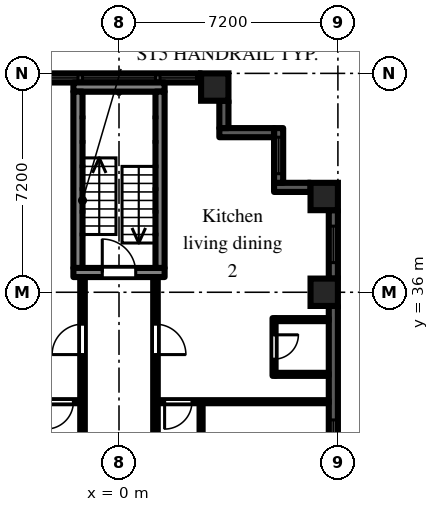
"""IFC4 building model, lengths in metres.
Left out: names, types, materials, properties, quantities, classifications, styles, units other than length and angle.
Written with IfcOpenShell. Run it as: python <this file> out.ifc"""

import sys

from ifc_helpers import new_model, si_unit, direction, frame, frame_2d, origin, origin_2d, place, context, subcontext, project, spatial, rectangle, extrude, element, fill, save


model = new_model("IFC4")
c1 = context("Model", 3, precision=1e-05, world=origin(), true_north=direction((0.0, 1.0)))
c2 = subcontext(c1, "Body", "Model", "MODEL_VIEW")
j1 = project(units=[si_unit("LENGTHUNIT", "METRE"), si_unit("PLANEANGLEUNIT", "RADIAN")], contexts=[c1])
p1 = place(None, origin())
s1 = spatial("IfcSite", under=j1, at=p1, CompositionType="ELEMENT")
p2 = place(p1, origin())
s2 = spatial("IfcBuilding", under=s1, at=p2, CompositionType="ELEMENT")
p3 = place(p2, frame((0.0, 0.0, 29.7)))
s3 = spatial("IfcBuildingStorey", under=s2, at=p3, CompositionType="ELEMENT", Elevation=29.7)
for number, where, z_axis, x_axis in (
    (1, (3.15, 42.75, 0.0), (0.0, 0.0, 1.0), (1.0, 0.0, 0.0)),
    (2, (6.75, 36.0, 0.0), (0.0, 0.0, 1.0), (1.0, 0.0, 0.0)),
    (3, (6.75, 39.15, 0.0), (0.0, 0.0, 1.0), (1.0, 0.0, 0.0)),
):
    element("IfcColumn", number, at=place(p3, frame(where, z_axis=z_axis, x_axis=x_axis)), inside=s3, PredefinedType="COLUMN", context=c2, shape_type="SweptSolid", body=[
        extrude(rectangle(XDim=0.9, YDim=0.9, at=origin_2d()), origin(), (0.0, 0.0, 1.0), 3.0),
    ])
p4 = place(p3, frame((7.05, 29.25, 0.0), z_axis=(0.0, 0.0, 1.0), x_axis=(0.0, 1.0, 0.0)))
e4 = element("IfcWall", 4, at=p4, inside=s3, PredefinedType="SOLIDWALL", context=c2, shape_type="SweptSolid", body=[
    extrude(rectangle(XDim=6.3, YDim=0.3, at=frame_2d((3.15, 0.0))), origin(), (0.0, 0.0, 1.0), 2.1),
])
p5 = place(p4, frame((0.15, 0.0, 0.2)))
e5 = element("IfcOpeningElement", 5, at=p5, cuts=e4, PredefinedType="OPENING", context=c2, shape_type="SweptSolid", body=[
    extrude(rectangle(XDim=2.4, YDim=1.85, at=frame_2d((1.2, 0.925))), frame((0.0, 0.16, 0.0), z_axis=(0.0, -1.0, 0.0), x_axis=(1.0, 0.0, 0.0)), (0.0, 0.0, 1.0), 0.32),
])
p6 = place(p3, frame((7.05, 36.45, 0.0), z_axis=(0.0, 0.0, 1.0), x_axis=(0.0, 1.0, 0.0)))
e6 = element("IfcWall", 6, at=p6, inside=s3, PredefinedType="SOLIDWALL", context=c2, shape_type="SweptSolid", body=[
    extrude(rectangle(XDim=2.25, YDim=0.3, at=frame_2d((1.125, 0.0))), origin(), (0.0, 0.0, 1.0), 2.1),
])
p7 = place(p6, frame((0.525, 0.0, 0.2)))
e7 = element("IfcOpeningElement", 7, at=p7, cuts=e6, PredefinedType="OPENING", context=c2, shape_type="SweptSolid", body=[
    extrude(rectangle(XDim=1.2, YDim=1.85, at=frame_2d((0.6, 0.925))), frame((0.0, 0.16, 0.0), z_axis=(0.0, -1.0, 0.0), x_axis=(1.0, 0.0, 0.0)), (0.0, 0.0, 1.0), 0.32),
])
p8 = place(p3, frame((6.3, 39.45, 0.0), z_axis=(0.0, 0.0, 1.0), x_axis=(-1.0, 0.0, 0.0)))
e8 = element("IfcWall", 8, at=p8, inside=s3, PredefinedType="SOLIDWALL", context=c2, shape_type="SweptSolid", body=[
    extrude(rectangle(XDim=1.2, YDim=0.3, at=frame_2d((0.6, 0.0))), origin(), (0.0, 0.0, 1.0), 2.575),
])
p9 = place(p3, frame((5.25, 39.6, 0.0), z_axis=(0.0, 0.0, 1.0), x_axis=(0.0, 1.0, 0.0)))
e9 = element("IfcWall", 9, at=p9, inside=s3, PredefinedType="SOLIDWALL", context=c2, shape_type="SweptSolid", body=[
    extrude(rectangle(XDim=1.8, YDim=0.3, at=frame_2d((0.9, 0.0))), origin(), (0.0, 0.0, 1.0), 2.575),
])
p10 = place(p9, frame((0.3, 0.0, 0.2)))
e10 = element("IfcOpeningElement", 10, at=p10, cuts=e9, PredefinedType="OPENING", context=c2, shape_type="SweptSolid", body=[
    extrude(rectangle(XDim=1.2, YDim=1.85, at=frame_2d((0.6, 0.925))), frame((0.0, 0.16, 0.0), z_axis=(0.0, -1.0, 0.0), x_axis=(1.0, 0.0, 0.0)), (0.0, 0.0, 1.0), 0.32),
])
p11 = place(p3, frame((5.1, 41.25, 0.0), z_axis=(0.0, 0.0, 1.0), x_axis=(-1.0, 0.0, 0.0)))
e11 = element("IfcWall", 11, at=p11, inside=s3, PredefinedType="SOLIDWALL", context=c2, shape_type="SweptSolid", body=[
    extrude(rectangle(XDim=1.8, YDim=0.3, at=frame_2d((0.9, 0.0))), origin(), (0.0, 0.0, 1.0), 2.575),
])
p12 = place(p3, frame((3.45, 41.4, 0.0), z_axis=(0.0, 0.0, 1.0), x_axis=(0.0, 1.0, 0.0)))
e12 = element("IfcWall", 12, at=p12, inside=s3, PredefinedType="SOLIDWALL", context=c2, shape_type="SweptSolid", body=[
    extrude(rectangle(XDim=0.9, YDim=0.3, at=frame_2d((0.45, 0.0))), origin(), (0.0, 0.0, 1.0), 2.575),
])
p13 = place(p3, frame((2.7, 43.05, 0.0), z_axis=(0.0, 0.0, 1.0), x_axis=(-1.0, 0.0, 0.0)))
e13 = element("IfcWall", 13, at=p13, inside=s3, PredefinedType="SOLIDWALL", context=c2, shape_type="SweptSolid", body=[
    extrude(rectangle(XDim=5.4, YDim=0.3, at=frame_2d((2.7, 0.0))), origin(), (0.0, 0.0, 1.0), 2.1),
])
p14 = place(p13, frame((1.5, 0.0, 0.2)))
e14 = element("IfcOpeningElement", 14, at=p14, cuts=e13, PredefinedType="OPENING", context=c2, shape_type="SweptSolid", body=[
    extrude(rectangle(XDim=2.4, YDim=1.85, at=frame_2d((1.2, 0.925))), frame((0.0, 0.16, 0.0), z_axis=(0.0, -1.0, 0.0), x_axis=(1.0, 0.0, 0.0)), (0.0, 0.0, 1.0), 0.32),
])
p15 = place(p13, frame((0.15, 0.0, 0.2)))
e15 = element("IfcOpeningElement", 15, at=p15, cuts=e13, PredefinedType="OPENING", context=c2, shape_type="SweptSolid", body=[
    extrude(rectangle(XDim=1.2, YDim=1.85, at=frame_2d((0.6, 0.925))), frame((0.0, 0.16, 0.0), z_axis=(0.0, -1.0, 0.0), x_axis=(1.0, 0.0, 0.0)), (0.0, 0.0, 1.0), 0.32),
])
p16 = place(p13, frame((4.05, 0.0, 0.2)))
e16 = element("IfcOpeningElement", 16, at=p16, cuts=e13, PredefinedType="OPENING", context=c2, shape_type="SweptSolid", body=[
    extrude(rectangle(XDim=1.2, YDim=1.85, at=frame_2d((0.6, 0.925))), frame((0.0, 0.16, 0.0), z_axis=(0.0, -1.0, 0.0), x_axis=(1.0, 0.0, 0.0)), (0.0, 0.0, 1.0), 0.32),
])
p17 = place(p3, frame((-1.5, 36.65, 0.0), z_axis=(0.0, 0.0, 1.0), x_axis=(1.0, 0.0, 0.0)))
e17 = element("IfcWall", 17, at=p17, inside=s3, PredefinedType="SHEAR", context=c2, shape_type="SweptSolid", body=[
    extrude(rectangle(XDim=3.0, YDim=0.3, at=frame_2d((1.5, 0.0))), origin(), (0.0, 0.0, 1.0), 2.575),
])
p18 = place(p17, frame((0.95, 0.0, 0.0)))
e18 = element("IfcOpeningElement", 18, at=p18, cuts=e17, PredefinedType="OPENING", context=c2, shape_type="SweptSolid", body=[
    extrude(rectangle(XDim=1.1, YDim=2.1, at=frame_2d((0.55, 1.05))), frame((0.0, 0.16, 0.0), z_axis=(0.0, -1.0, 0.0), x_axis=(1.0, 0.0, 0.0)), (0.0, 0.0, 1.0), 0.32),
])
p19 = place(p3, frame((-1.5, 42.75, 0.0), z_axis=(0.0, 0.0, 1.0), x_axis=(1.0, 0.0, 0.0)))
e19 = element("IfcWall", 19, at=p19, inside=s3, PredefinedType="SHEAR", context=c2, shape_type="SweptSolid", body=[
    extrude(rectangle(XDim=3.0, YDim=0.3, at=frame_2d((1.5, 0.0))), origin(), (0.0, 0.0, 1.0), 2.575),
])
for number, where, z_axis, x_axis in (
    (20, (-1.35, 36.8, 0.0), (0.0, 0.0, 1.0), (0.0, 1.0, 0.0)),
    (21, (1.35, 36.8, 0.0), (0.0, 0.0, 1.0), (0.0, 1.0, 0.0)),
):
    element("IfcWall", number, at=place(p3, frame(where, z_axis=z_axis, x_axis=x_axis)), inside=s3, PredefinedType="SHEAR", context=c2, shape_type="SweptSolid", body=[
        extrude(rectangle(XDim=5.8, YDim=0.3, at=frame_2d((2.9, 0.0))), origin(), (0.0, 0.0, 1.0), 2.575),
    ])
p20 = place(p3, frame((-6.9, 32.4, 0.0), z_axis=(0.0, 0.0, 1.0), x_axis=(1.0, 0.0, 0.0)))
e22 = element("IfcWall", 22, at=p20, inside=s3, PredefinedType="PARTITIONING", context=c2, shape_type="SweptSolid", body=[
    extrude(rectangle(XDim=5.625, YDim=0.1, at=frame_2d((2.812, 0.0))), origin(), (0.0, 0.0, 1.0), 2.575),
])
p21 = place(p20, frame((4.5, 0.0, 0.0)))
e23 = element("IfcOpeningElement", 23, at=p21, cuts=e22, PredefinedType="OPENING", context=c2, shape_type="SweptSolid", body=[
    extrude(rectangle(XDim=0.9, YDim=2.1, at=frame_2d((0.45, 1.05))), frame((0.0, 0.06, 0.0), z_axis=(0.0, -1.0, 0.0), x_axis=(1.0, 0.0, 0.0)), (0.0, 0.0, 1.0), 0.12),
])
p22 = place(p3, frame((-1.2, 1.125, 0.0), z_axis=(0.0, 0.0, 1.0), x_axis=(0.0, 1.0, 0.0)))
e24 = element("IfcWall", 24, at=p22, inside=s3, PredefinedType="PARTITIONING", context=c2, shape_type="SweptSolid", body=[
    extrude(rectangle(XDim=35.375, YDim=0.15, at=frame_2d((17.688, 0.0))), origin(), (0.0, 0.0, 1.0), 2.575),
])
p23 = place(p22, frame((2.625, 0.0, 0.0)))
e25 = element("IfcOpeningElement", 25, at=p23, cuts=e24, PredefinedType="OPENING", context=c2, shape_type="SweptSolid", body=[
    extrude(rectangle(XDim=0.9, YDim=2.1, at=frame_2d((0.45, 1.05))), frame((0.0, 0.085, 0.0), z_axis=(0.0, -1.0, 0.0), x_axis=(1.0, 0.0, 0.0)), (0.0, 0.0, 1.0), 0.17),
])
p24 = place(p22, frame((11.025, 0.0, 0.0)))
e26 = element("IfcOpeningElement", 26, at=p24, cuts=e24, PredefinedType="OPENING", context=c2, shape_type="SweptSolid", body=[
    extrude(rectangle(XDim=0.9, YDim=2.1, at=frame_2d((0.45, 1.05))), frame((0.0, 0.085, 0.0), z_axis=(0.0, -1.0, 0.0), x_axis=(1.0, 0.0, 0.0)), (0.0, 0.0, 1.0), 0.17),
])
p25 = place(p22, frame((14.625, 0.0, 0.0)))
e27 = element("IfcOpeningElement", 27, at=p25, cuts=e24, PredefinedType="OPENING", context=c2, shape_type="SweptSolid", body=[
    extrude(rectangle(XDim=0.9, YDim=2.1, at=frame_2d((0.45, 1.05))), frame((0.0, 0.085, 0.0), z_axis=(0.0, -1.0, 0.0), x_axis=(1.0, 0.0, 0.0)), (0.0, 0.0, 1.0), 0.17),
])
p26 = place(p22, frame((32.825, 0.0, 0.0)))
e28 = element("IfcOpeningElement", 28, at=p26, cuts=e24, PredefinedType="OPENING", context=c2, shape_type="SweptSolid", body=[
    extrude(rectangle(XDim=1.0, YDim=2.1, at=frame_2d((0.5, 1.05))), frame((0.0, 0.085, 0.0), z_axis=(0.0, -1.0, 0.0), x_axis=(1.0, 0.0, 0.0)), (0.0, 0.0, 1.0), 0.17),
])
p27 = place(p3, frame((1.2, 1.125, 0.0), z_axis=(0.0, 0.0, 1.0), x_axis=(0.0, 1.0, 0.0)))
e29 = element("IfcWall", 29, at=p27, inside=s3, PredefinedType="PARTITIONING", context=c2, shape_type="SweptSolid", body=[
    extrude(rectangle(XDim=35.375, YDim=0.15, at=frame_2d((17.688, 0.0))), origin(), (0.0, 0.0, 1.0), 2.575),
])
p28 = place(p27, frame((3.725, 0.0, 0.0)))
e30 = element("IfcOpeningElement", 30, at=p28, cuts=e29, PredefinedType="OPENING", context=c2, shape_type="SweptSolid", body=[
    extrude(rectangle(XDim=0.9, YDim=2.1, at=frame_2d((0.45, 1.05))), frame((0.0, 0.085, 0.0), z_axis=(0.0, -1.0, 0.0), x_axis=(1.0, 0.0, 0.0)), (0.0, 0.0, 1.0), 0.17),
])
p29 = place(p27, frame((7.425, 0.0, 0.0)))
e31 = element("IfcOpeningElement", 31, at=p29, cuts=e29, PredefinedType="OPENING", context=c2, shape_type="SweptSolid", body=[
    extrude(rectangle(XDim=0.9, YDim=2.1, at=frame_2d((0.45, 1.05))), frame((0.0, 0.085, 0.0), z_axis=(0.0, -1.0, 0.0), x_axis=(1.0, 0.0, 0.0)), (0.0, 0.0, 1.0), 0.17),
])
p30 = place(p27, frame((13.475, 0.0, 0.0)))
e32 = element("IfcOpeningElement", 32, at=p30, cuts=e29, PredefinedType="OPENING", context=c2, shape_type="SweptSolid", body=[
    extrude(rectangle(XDim=1.0, YDim=2.1, at=frame_2d((0.5, 1.05))), frame((0.0, 0.085, 0.0), z_axis=(0.0, -1.0, 0.0), x_axis=(1.0, 0.0, 0.0)), (0.0, 0.0, 1.0), 0.17),
])
p31 = place(p27, frame((32.825, 0.0, 0.0)))
e33 = element("IfcOpeningElement", 33, at=p31, cuts=e29, PredefinedType="OPENING", context=c2, shape_type="SweptSolid", body=[
    extrude(rectangle(XDim=1.0, YDim=2.1, at=frame_2d((0.5, 1.05))), frame((0.0, 0.085, 0.0), z_axis=(0.0, -1.0, 0.0), x_axis=(1.0, 0.0, 0.0)), (0.0, 0.0, 1.0), 0.17),
])
p32 = place(p3, frame((1.275, 32.4, 0.0), z_axis=(0.0, 0.0, 1.0), x_axis=(1.0, 0.0, 0.0)))
e34 = element("IfcWall", 34, at=p32, inside=s3, PredefinedType="PARTITIONING", context=c2, shape_type="SweptSolid", body=[
    extrude(rectangle(XDim=5.625, YDim=0.1, at=frame_2d((2.812, 0.0))), origin(), (0.0, 0.0, 1.0), 2.575),
])
p33 = place(p32, frame((0.225, 0.0, 0.0)))
e35 = element("IfcOpeningElement", 35, at=p33, cuts=e34, PredefinedType="OPENING", context=c2, shape_type="SweptSolid", body=[
    extrude(rectangle(XDim=0.9, YDim=2.1, at=frame_2d((0.45, 1.05))), frame((0.0, 0.06, 0.0), z_axis=(0.0, -1.0, 0.0), x_axis=(1.0, 0.0, 0.0)), (0.0, 0.0, 1.0), 0.12),
])
p34 = place(p3, frame((2.7, 18.1, 0.0), z_axis=(0.0, 0.0, 1.0), x_axis=(0.0, 1.0, 0.0)))
e36 = element("IfcWall", 36, at=p34, inside=s3, PredefinedType="PARTITIONING", context=c2, shape_type="SweptSolid", body=[
    extrude(rectangle(XDim=14.25, YDim=0.1, at=frame_2d((7.125, 0.0))), origin(), (0.0, 0.0, 1.0), 2.575),
])
p35 = place(p34, frame((3.23, 0.0, 0.0)))
e37 = element("IfcOpeningElement", 37, at=p35, cuts=e36, PredefinedType="OPENING", context=c2, shape_type="SweptSolid", body=[
    extrude(rectangle(XDim=0.9, YDim=2.1, at=frame_2d((0.45, 1.05))), frame((0.0, 0.06, 0.0), z_axis=(0.0, -1.0, 0.0), x_axis=(1.0, 0.0, 0.0)), (0.0, 0.0, 1.0), 0.12),
])
p36 = place(p34, frame((10.07, 0.0, 0.0)))
e38 = element("IfcOpeningElement", 38, at=p36, cuts=e36, PredefinedType="OPENING", context=c2, shape_type="SweptSolid", body=[
    extrude(rectangle(XDim=0.9, YDim=2.1, at=frame_2d((0.45, 1.05))), frame((0.0, 0.06, 0.0), z_axis=(0.0, -1.0, 0.0), x_axis=(1.0, 0.0, 0.0)), (0.0, 0.0, 1.0), 0.12),
])
p37 = place(p3, frame((5.1, 33.25, 0.0), z_axis=(0.0, 0.0, 1.0), x_axis=(0.0, 1.0, 0.0)))
e39 = element("IfcWall", 39, at=p37, inside=s3, PredefinedType="PARTITIONING", context=c2, shape_type="SweptSolid", body=[
    extrude(rectangle(XDim=1.9, YDim=0.1, at=frame_2d((0.95, 0.0))), origin(), (0.0, 0.0, 1.0), 2.575),
])
p38 = place(p37, frame((0.55, 0.0, 0.0)))
e40 = element("IfcOpeningElement", 40, at=p38, cuts=e39, PredefinedType="OPENING", context=c2, shape_type="SweptSolid", body=[
    extrude(rectangle(XDim=0.8, YDim=2.1, at=frame_2d((0.4, 1.05))), frame((0.0, 0.06, 0.0), z_axis=(0.0, -1.0, 0.0), x_axis=(1.0, 0.0, 0.0)), (0.0, 0.0, 1.0), 0.12),
])
for number, where, z_axis, x_axis in (
    (41, (5.15, 33.3, 0.0), (0.0, 0.0, 1.0), (1.0, 0.0, 0.0)),
    (42, (5.15, 35.1, 0.0), (0.0, 0.0, 1.0), (1.0, 0.0, 0.0)),
):
    element("IfcWall", number, at=place(p3, frame(where, z_axis=z_axis, x_axis=x_axis)), inside=s3, PredefinedType="PARTITIONING", context=c2, shape_type="SweptSolid", body=[
        extrude(rectangle(XDim=1.75, YDim=0.1, at=frame_2d((0.875, 0.0))), origin(), (0.0, 0.0, 1.0), 2.575),
    ])
p39 = place(p5, origin())
e43 = element("IfcWindow", 43, at=p39, inside=s3, PartitioningType="SINGLE_PANEL", PredefinedType="WINDOW", context=c2, shape_type="SweptSolid", body=[
    extrude(rectangle(XDim=2.4, YDim=1.85, at=frame_2d((1.2, 0.925))), frame((0.0, 0.03, 0.0), z_axis=(0.0, -1.0, 0.0), x_axis=(1.0, 0.0, 0.0)), (0.0, 0.0, 1.0), 0.06),
])
fill(e5, e43)
p40 = place(p7, origin())
e44 = element("IfcWindow", 44, at=p40, inside=s3, PartitioningType="SINGLE_PANEL", PredefinedType="WINDOW", context=c2, shape_type="SweptSolid", body=[
    extrude(rectangle(XDim=1.2, YDim=1.85, at=frame_2d((0.6, 0.925))), frame((0.0, 0.03, 0.0), z_axis=(0.0, -1.0, 0.0), x_axis=(1.0, 0.0, 0.0)), (0.0, 0.0, 1.0), 0.06),
])
fill(e7, e44)
p41 = place(p10, origin())
e45 = element("IfcWindow", 45, at=p41, inside=s3, PartitioningType="SINGLE_PANEL", PredefinedType="WINDOW", context=c2, shape_type="SweptSolid", body=[
    extrude(rectangle(XDim=1.2, YDim=1.85, at=frame_2d((0.6, 0.925))), frame((0.0, 0.03, 0.0), z_axis=(0.0, -1.0, 0.0), x_axis=(1.0, 0.0, 0.0)), (0.0, 0.0, 1.0), 0.06),
])
fill(e10, e45)
p42 = place(p14, origin())
e46 = element("IfcWindow", 46, at=p42, inside=s3, PartitioningType="SINGLE_PANEL", PredefinedType="WINDOW", context=c2, shape_type="SweptSolid", body=[
    extrude(rectangle(XDim=2.4, YDim=1.85, at=frame_2d((1.2, 0.925))), frame((0.0, 0.03, 0.0), z_axis=(0.0, -1.0, 0.0), x_axis=(1.0, 0.0, 0.0)), (0.0, 0.0, 1.0), 0.06),
])
fill(e14, e46)
p43 = place(p15, origin())
e47 = element("IfcWindow", 47, at=p43, inside=s3, PartitioningType="SINGLE_PANEL", PredefinedType="WINDOW", context=c2, shape_type="SweptSolid", body=[
    extrude(rectangle(XDim=1.2, YDim=1.85, at=frame_2d((0.6, 0.925))), frame((0.0, 0.03, 0.0), z_axis=(0.0, -1.0, 0.0), x_axis=(1.0, 0.0, 0.0)), (0.0, 0.0, 1.0), 0.06),
])
fill(e15, e47)
p44 = place(p16, origin())
e48 = element("IfcWindow", 48, at=p44, inside=s3, PartitioningType="SINGLE_PANEL", PredefinedType="WINDOW", context=c2, shape_type="SweptSolid", body=[
    extrude(rectangle(XDim=1.2, YDim=1.85, at=frame_2d((0.6, 0.925))), frame((0.0, 0.03, 0.0), z_axis=(0.0, -1.0, 0.0), x_axis=(1.0, 0.0, 0.0)), (0.0, 0.0, 1.0), 0.06),
])
fill(e16, e48)
p45 = place(p18, origin())
e49 = element("IfcDoor", 49, at=p45, inside=s3, OperationType="SINGLE_SWING_LEFT", PredefinedType="DOOR", context=c2, shape_type="SweptSolid", body=[
    extrude(rectangle(XDim=1.1, YDim=2.1, at=frame_2d((0.55, 1.05))), frame((0.0, 0.025, 0.0), z_axis=(0.0, -1.0, 0.0), x_axis=(1.0, 0.0, 0.0)), (0.0, 0.0, 1.0), 0.05),
])
fill(e18, e49)
p46 = place(p26, origin())
e50 = element("IfcDoor", 50, at=p46, inside=s3, OperationType="SINGLE_SWING_LEFT", PredefinedType="DOOR", context=c2, shape_type="SweptSolid", body=[
    extrude(rectangle(XDim=1.0, YDim=2.1, at=frame_2d((0.5, 1.05))), frame((0.0, 0.025, 0.0), z_axis=(0.0, -1.0, 0.0), x_axis=(1.0, 0.0, 0.0)), (0.0, 0.0, 1.0), 0.05),
])
fill(e28, e50)
p47 = place(p21, frame((0.9, 0.0, 0.0), z_axis=(0.0, 0.0, 1.0), x_axis=(-1.0, 0.0, 0.0)))
e51 = element("IfcDoor", 51, at=p47, inside=s3, OperationType="SINGLE_SWING_RIGHT", PredefinedType="DOOR", context=c2, shape_type="SweptSolid", body=[
    extrude(rectangle(XDim=0.9, YDim=2.1, at=frame_2d((0.45, 1.05))), frame((0.0, 0.025, 0.0), z_axis=(0.0, -1.0, 0.0), x_axis=(1.0, 0.0, 0.0)), (0.0, 0.0, 1.0), 0.05),
])
fill(e23, e51)
p48 = place(p38, frame((0.8, 0.0, 0.0), z_axis=(0.0, 0.0, 1.0), x_axis=(-1.0, 0.0, 0.0)))
e52 = element("IfcDoor", 52, at=p48, inside=s3, OperationType="SINGLE_SWING_LEFT", PredefinedType="DOOR", context=c2, shape_type="SweptSolid", body=[
    extrude(rectangle(XDim=0.8, YDim=2.1, at=frame_2d((0.4, 1.05))), frame((0.0, 0.025, 0.0), z_axis=(0.0, -1.0, 0.0), x_axis=(1.0, 0.0, 0.0)), (0.0, 0.0, 1.0), 0.05),
])
fill(e40, e52)
p49 = place(p31, frame((1.0, 0.0, 0.0), z_axis=(0.0, 0.0, 1.0), x_axis=(-1.0, 0.0, 0.0)))
e53 = element("IfcDoor", 53, at=p49, inside=s3, OperationType="SINGLE_SWING_RIGHT", PredefinedType="DOOR", context=c2, shape_type="SweptSolid", body=[
    extrude(rectangle(XDim=1.0, YDim=2.1, at=frame_2d((0.5, 1.05))), frame((0.0, 0.025, 0.0), z_axis=(0.0, -1.0, 0.0), x_axis=(1.0, 0.0, 0.0)), (0.0, 0.0, 1.0), 0.05),
])
fill(e33, e53)
p50 = place(p33, frame((0.9, 0.0, 0.0), z_axis=(0.0, 0.0, 1.0), x_axis=(-1.0, 0.0, 0.0)))
e54 = element("IfcDoor", 54, at=p50, inside=s3, OperationType="SINGLE_SWING_RIGHT", PredefinedType="DOOR", context=c2, shape_type="SweptSolid", body=[
    extrude(rectangle(XDim=0.9, YDim=2.1, at=frame_2d((0.45, 1.05))), frame((0.0, 0.025, 0.0), z_axis=(0.0, -1.0, 0.0), x_axis=(1.0, 0.0, 0.0)), (0.0, 0.0, 1.0), 0.05),
])
fill(e35, e54)
save(model, sys.argv[1])
